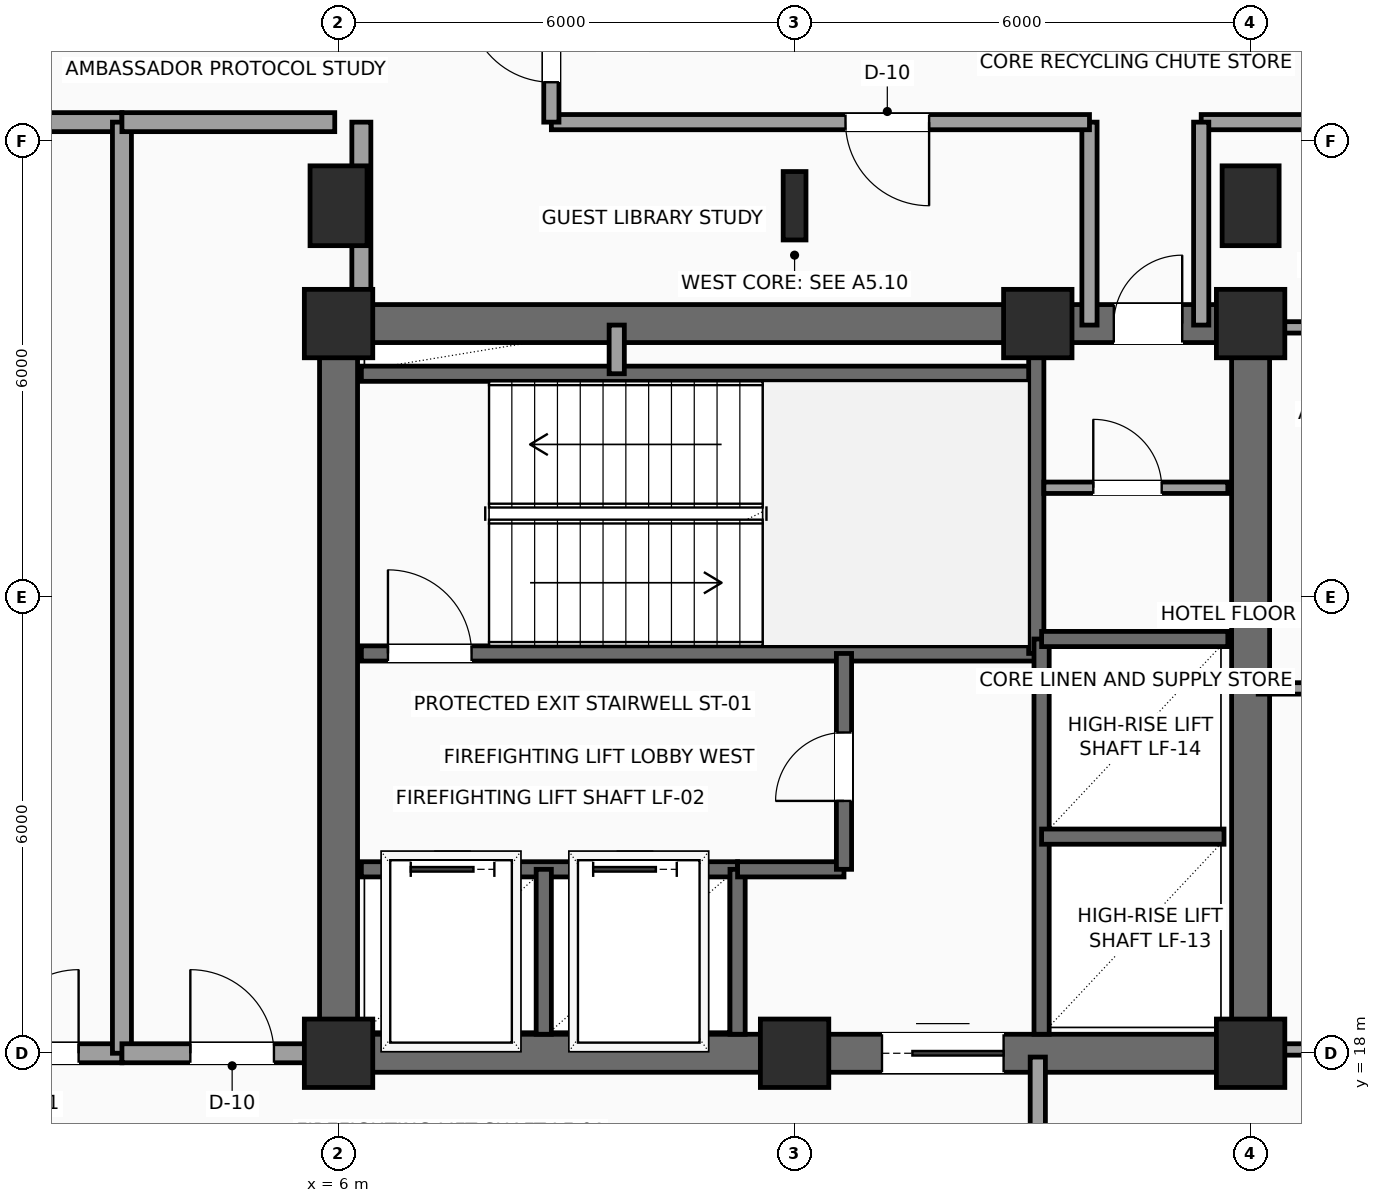
"""IFC4 building model, lengths in metres.
Left out: names, types, materials, properties, quantities, classifications, styles, units other than length and angle.
Written with IfcOpenShell. Run it as: python <this file> out.ifc"""

import sys

from ifc_helpers import new_model, si_unit, direction, frame, frame_2d, origin, origin_2d, place, context, subcontext, project, spatial, rectangle, i_section, extrude, element, fill, save


model = new_model("IFC4")
c1 = context("Model", 3, precision=1e-05, world=origin(), true_north=direction((0.0, 1.0)))
c2 = subcontext(c1, "Body", "Model", "MODEL_VIEW")
j1 = project(units=[si_unit("LENGTHUNIT", "METRE"), si_unit("PLANEANGLEUNIT", "RADIAN")], contexts=[c1])
p1 = place(None, origin())
s1 = spatial("IfcSite", under=j1, at=p1, CompositionType="ELEMENT")
p2 = place(p1, origin())
s2 = spatial("IfcBuilding", under=s1, at=p2, CompositionType="ELEMENT")
p3 = place(p2, frame((0.0, 0.0, 187.95)))
s3 = spatial("IfcBuildingStorey", under=s2, at=p3, CompositionType="ELEMENT", Elevation=187.95)
for number, where, z_axis, x_axis in (
    (1, (6.0, 18.0, 0.0), (0.0, 0.0, 1.0), (1.0, 0.0, 0.0)),
    (2, (12.0, 18.0, 0.0), (0.0, 0.0, 1.0), (1.0, 0.0, 0.0)),
    (3, (18.0, 18.0, 0.0), (0.0, 0.0, 1.0), (1.0, 0.0, 0.0)),
    (4, (6.0, 27.6, 0.0), (0.0, 0.0, 1.0), (1.0, 0.0, 0.0)),
    (5, (15.2, 27.6, 0.0), (0.0, 0.0, 1.0), (1.0, 0.0, 0.0)),
    (6, (18.0, 27.6, 0.0), (0.0, 0.0, 1.0), (1.0, 0.0, 0.0)),
):
    element("IfcColumn", number, at=place(p3, frame(where, z_axis=z_axis, x_axis=x_axis)), inside=s3, PredefinedType="COLUMN", context=c2, shape_type="SweptSolid", body=[
        extrude(rectangle(XDim=0.9, YDim=0.9, at=origin_2d()), origin(), (0.0, 0.0, 1.0), 3.75),
    ])
p4 = place(p3, frame((6.0, 29.15, 0.0), z_axis=(0.0, 0.0, 1.0), x_axis=(1.0, 0.0, 0.0)))
e7 = element("IfcColumn", 7, at=p4, inside=s3, PredefinedType="COLUMN", context=c2, shape_type="SweptSolid", body=[
    extrude(rectangle(XDim=0.75, YDim=1.05, at=origin_2d()), origin(), (0.0, 0.0, 1.0), 3.75),
])
p5 = place(p3, frame((12.0, 29.15, 0.0), z_axis=(0.0, 0.0, 1.0), x_axis=(1.0, 0.0, 0.0)))
e8 = element("IfcColumn", 8, at=p5, inside=s3, PredefinedType="COLUMN", context=c2, shape_type="SweptSolid", body=[
    extrude(i_section(OverallWidth=0.3, OverallDepth=0.9, WebThickness=0.019, FlangeThickness=0.035, FilletRadius=0.03, at=origin_2d()), origin(), (0.0, 0.0, 1.0), 3.75),
])
p6 = place(p3, frame((18.0, 29.15, 0.0), z_axis=(0.0, 0.0, 1.0), x_axis=(1.0, 0.0, 0.0)))
e9 = element("IfcColumn", 9, at=p6, inside=s3, PredefinedType="COLUMN", context=c2, shape_type="SweptSolid", body=[
    extrude(rectangle(XDim=0.75, YDim=1.05, at=origin_2d()), origin(), (0.0, 0.0, 1.0), 3.75),
])
p7 = place(p3, frame((6.0, 18.0, 0.0), z_axis=(0.0, 0.0, 1.0), x_axis=(1.0, 0.0, 0.0)))
e10 = element("IfcWall", 10, at=p7, inside=s3, PredefinedType="SHEAR", context=c2, shape_type="SweptSolid", body=[
    extrude(rectangle(XDim=12.0, YDim=0.5, at=frame_2d((6.0, 0.0))), origin(), (0.0, 0.0, 1.0), 3.54),
])
p8 = place(p7, frame((7.15, 0.0, 0.0)))
e11 = element("IfcOpeningElement", 11, at=p8, cuts=e10, PredefinedType="OPENING", context=c2, shape_type="SweptSolid", body=[
    extrude(rectangle(XDim=1.6, YDim=2.3, at=frame_2d((0.8, 1.15))), frame((0.0, 0.26, 0.0), z_axis=(0.0, -1.0, 0.0), x_axis=(1.0, 0.0, 0.0)), (0.0, 0.0, 1.0), 0.52),
])
p9 = place(p3, frame((6.0, 27.6, 0.0), z_axis=(0.0, 0.0, 1.0), x_axis=(1.0, 0.0, 0.0)))
e12 = element("IfcWall", 12, at=p9, inside=s3, PredefinedType="SHEAR", context=c2, shape_type="SweptSolid", body=[
    extrude(rectangle(XDim=12.0, YDim=0.5, at=frame_2d((6.0, 0.0))), origin(), (0.0, 0.0, 1.0), 3.54),
])
p10 = place(p9, frame((10.2, 0.0, 0.0)))
e13 = element("IfcOpeningElement", 13, at=p10, cuts=e12, PredefinedType="OPENING", context=c2, shape_type="SweptSolid", body=[
    extrude(rectangle(XDim=0.9, YDim=2.15, at=frame_2d((0.45, 1.075))), frame((0.0, 0.26, 0.0), z_axis=(0.0, -1.0, 0.0), x_axis=(1.0, 0.0, 0.0)), (0.0, 0.0, 1.0), 0.52),
])
for number, where, z_axis, x_axis in (
    (14, (6.0, 18.0, 0.0), (0.0, 0.0, 1.0), (0.0, 1.0, 0.0)),
    (15, (18.0, 18.0, 0.0), (0.0, 0.0, 1.0), (0.0, 1.0, 0.0)),
):
    element("IfcWall", number, at=place(p3, frame(where, z_axis=z_axis, x_axis=x_axis)), inside=s3, PredefinedType="SHEAR", context=c2, shape_type="SweptSolid", body=[
        extrude(rectangle(XDim=9.6, YDim=0.5, at=frame_2d((4.8, 0.0))), origin(), (0.0, 0.0, 1.0), 3.54),
    ])
p11 = place(p3, frame((6.3, 23.26, 0.0), z_axis=(0.0, 0.0, 1.0), x_axis=(1.0, 0.0, 0.0)))
e16 = element("IfcWall", 16, at=p11, inside=s3, PredefinedType="SHEAR", context=c2, shape_type="SweptSolid", body=[
    extrude(rectangle(XDim=8.88, YDim=0.2, at=frame_2d((4.44, 0.0))), origin(), (0.0, 0.0, 1.0), 3.54),
])
p12 = place(p11, frame((0.35, 0.0, 0.0)))
e17 = element("IfcOpeningElement", 17, at=p12, cuts=e16, PredefinedType="OPENING", context=c2, shape_type="SweptSolid", body=[
    extrude(rectangle(XDim=1.1, YDim=2.2, at=frame_2d((0.55, 1.1))), frame((0.0, 0.11, 0.0), z_axis=(0.0, -1.0, 0.0), x_axis=(1.0, 0.0, 0.0)), (0.0, 0.0, 1.0), 0.22),
])
p13 = place(p3, frame((6.3, 26.94, 0.0), z_axis=(0.0, 0.0, 1.0), x_axis=(1.0, 0.0, 0.0)))
e18 = element("IfcWall", 18, at=p13, inside=s3, PredefinedType="SHEAR", context=c2, shape_type="SweptSolid", body=[
    extrude(rectangle(XDim=8.88, YDim=0.2, at=frame_2d((4.44, 0.0))), origin(), (0.0, 0.0, 1.0), 3.54),
])
p14 = place(p3, frame((15.18, 23.26, 0.0), z_axis=(0.0, 0.0, 1.0), x_axis=(0.0, 1.0, 0.0)))
e19 = element("IfcWall", 19, at=p14, inside=s3, PredefinedType="SHEAR", context=c2, shape_type="SweptSolid", body=[
    extrude(rectangle(XDim=4.04, YDim=0.2, at=frame_2d((2.02, 0.0))), origin(), (0.0, 0.0, 1.0), 3.54),
])
p15 = place(p3, frame((6.3, 20.42, 0.0), z_axis=(0.0, 0.0, 1.0), x_axis=(1.0, 0.0, 0.0)))
e20 = element("IfcWall", 20, at=p15, inside=s3, PredefinedType="SHEAR", context=c2, shape_type="SweptSolid", body=[
    extrude(rectangle(XDim=4.95, YDim=0.2, at=frame_2d((2.475, 0.0))), origin(), (0.0, 0.0, 1.0), 3.54),
])
p16 = place(p15, frame((0.65, 0.0, 0.0)))
e21 = element("IfcOpeningElement", 21, at=p16, cuts=e20, PredefinedType="OPENING", context=c2, shape_type="SweptSolid", body=[
    extrude(rectangle(XDim=1.1, YDim=2.2, at=frame_2d((0.55, 1.1))), frame((0.0, 0.11, 0.0), z_axis=(0.0, -1.0, 0.0), x_axis=(1.0, 0.0, 0.0)), (0.0, 0.0, 1.0), 0.22),
])
p17 = place(p15, frame((3.05, 0.0, 0.0)))
e22 = element("IfcOpeningElement", 22, at=p17, cuts=e20, PredefinedType="OPENING", context=c2, shape_type="SweptSolid", body=[
    extrude(rectangle(XDim=1.1, YDim=2.2, at=frame_2d((0.55, 1.1))), frame((0.0, 0.11, 0.0), z_axis=(0.0, -1.0, 0.0), x_axis=(1.0, 0.0, 0.0)), (0.0, 0.0, 1.0), 0.22),
])
for number, where, z_axis, x_axis in (
    (23, (8.7, 18.25, 0.0), (0.0, 0.0, 1.0), (0.0, 1.0, 0.0)),
    (24, (11.25, 18.25, 0.0), (0.0, 0.0, 1.0), (0.0, 1.0, 0.0)),
):
    element("IfcWall", number, at=place(p3, frame(where, z_axis=z_axis, x_axis=x_axis)), inside=s3, PredefinedType="SHEAR", context=c2, shape_type="SweptSolid", body=[
        extrude(rectangle(XDim=2.17, YDim=0.2, at=frame_2d((1.085, 0.0))), origin(), (0.0, 0.0, 1.0), 3.54),
    ])
p18 = place(p3, frame((11.25, 20.42, 0.0), z_axis=(0.0, 0.0, 1.0), x_axis=(1.0, 0.0, 0.0)))
e25 = element("IfcWall", 25, at=p18, inside=s3, PredefinedType="SHEAR", context=c2, shape_type="SweptSolid", body=[
    extrude(rectangle(XDim=1.4, YDim=0.2, at=frame_2d((0.7, 0.0))), origin(), (0.0, 0.0, 1.0), 3.54),
])
p19 = place(p3, frame((12.65, 20.42, 0.0), z_axis=(0.0, 0.0, 1.0), x_axis=(0.0, 1.0, 0.0)))
e26 = element("IfcWall", 26, at=p19, inside=s3, PredefinedType="SHEAR", context=c2, shape_type="SweptSolid", body=[
    extrude(rectangle(XDim=2.84, YDim=0.2, at=frame_2d((1.42, 0.0))), origin(), (0.0, 0.0, 1.0), 3.54),
])
p20 = place(p19, frame((0.9, 0.0, 0.0)))
e27 = element("IfcOpeningElement", 27, at=p20, cuts=e26, PredefinedType="OPENING", context=c2, shape_type="SweptSolid", body=[
    extrude(rectangle(XDim=0.9, YDim=2.15, at=frame_2d((0.45, 1.075))), frame((0.0, 0.11, 0.0), z_axis=(0.0, -1.0, 0.0), x_axis=(1.0, 0.0, 0.0)), (0.0, 0.0, 1.0), 0.22),
])
p21 = place(p3, frame((9.66, 26.94, 0.0), z_axis=(0.0, 0.0, 1.0), x_axis=(0.0, 1.0, 0.0)))
e28 = element("IfcWall", 28, at=p21, inside=s3, PredefinedType="SOLIDWALL", context=c2, shape_type="SweptSolid", body=[
    extrude(rectangle(XDim=0.64, YDim=0.2, at=frame_2d((0.32, 0.0))), origin(), (0.0, 0.0, 1.0), 3.54),
])
p22 = place(p3, frame((15.25, 18.25, 0.0), z_axis=(0.0, 0.0, 1.0), x_axis=(0.0, 1.0, 0.0)))
e29 = element("IfcWall", 29, at=p22, inside=s3, PredefinedType="SHEAR", context=c2, shape_type="SweptSolid", body=[
    extrude(rectangle(XDim=5.2, YDim=0.2, at=frame_2d((2.6, 0.0))), origin(), (0.0, 0.0, 1.0), 3.54),
])
p23 = place(p3, frame((15.25, 20.85, 0.0), z_axis=(0.0, 0.0, 1.0), x_axis=(1.0, 0.0, 0.0)))
e30 = element("IfcWall", 30, at=p23, inside=s3, PredefinedType="SHEAR", context=c2, shape_type="SweptSolid", body=[
    extrude(rectangle(XDim=2.4, YDim=0.2, at=frame_2d((1.2, 0.0))), origin(), (0.0, 0.0, 1.0), 3.54),
])
p24 = place(p3, frame((15.25, 23.45, 0.0), z_axis=(0.0, 0.0, 1.0), x_axis=(1.0, 0.0, 0.0)))
e31 = element("IfcWall", 31, at=p24, inside=s3, PredefinedType="SHEAR", context=c2, shape_type="SweptSolid", body=[
    extrude(rectangle(XDim=2.45, YDim=0.2, at=frame_2d((1.225, 0.0))), origin(), (0.0, 0.0, 1.0), 3.54),
])
p25 = place(p3, frame((15.28, 25.44, 0.0), z_axis=(0.0, 0.0, 1.0), x_axis=(1.0, 0.0, 0.0)))
e32 = element("IfcWall", 32, at=p25, inside=s3, PredefinedType="PARTITIONING", context=c2, shape_type="SweptSolid", body=[
    extrude(rectangle(XDim=2.42, YDim=0.15, at=frame_2d((1.21, 0.0))), origin(), (0.0, 0.0, 1.0), 3.54),
])
p26 = place(p25, frame((0.65, 0.0, 0.0)))
e33 = element("IfcOpeningElement", 33, at=p26, cuts=e32, PredefinedType="OPENING", context=c2, shape_type="SweptSolid", body=[
    extrude(rectangle(XDim=0.9, YDim=2.15, at=frame_2d((0.45, 1.075))), frame((0.0, 0.085, 0.0), z_axis=(0.0, -1.0, 0.0), x_axis=(1.0, 0.0, 0.0)), (0.0, 0.0, 1.0), 0.17),
])
p27 = place(p3, frame((15.2, 17.95, 0.0), z_axis=(0.0, 0.0, 1.0), x_axis=(0.0, -1.0, 0.0)))
e34 = element("IfcWall", 34, at=p27, inside=s3, PredefinedType="SOLIDWALL", context=c2, shape_type="SweptSolid", body=[
    extrude(rectangle(XDim=1.7, YDim=0.2, at=frame_2d((0.85, 0.0))), origin(), (0.0, 0.0, 1.0), 3.54),
])
p28 = place(p3, frame((21.45, 30.25, 0.0), z_axis=(0.0, 0.0, 1.0), x_axis=(-1.0, 0.0, 0.0)))
e35 = element("IfcWall", 35, at=p28, inside=s3, PredefinedType="SOLIDWALL", context=c2, shape_type="SweptSolid", body=[
    extrude(rectangle(XDim=4.1, YDim=0.2, at=frame_2d((2.05, 0.0))), origin(), (0.0, 0.0, 1.0), 3.54),
])
p29 = place(p28, frame((1.55, 0.0, 0.0)))
e36 = element("IfcOpeningElement", 36, at=p29, cuts=e35, PredefinedType="OPENING", context=c2, shape_type="SweptSolid", body=[
    extrude(rectangle(XDim=1.1, YDim=2.25, at=frame_2d((0.55, 1.125))), frame((0.0, 0.11, 0.0), z_axis=(0.0, -1.0, 0.0), x_axis=(1.0, 0.0, 0.0)), (0.0, 0.0, 1.0), 0.22),
])
for number, where, z_axis, x_axis in (
    (37, (17.35, 30.25, 0.0), (0.0, 0.0, 1.0), (0.0, -1.0, 0.0)),
    (38, (15.88, 27.58, 0.0), (0.0, 0.0, 1.0), (0.0, 1.0, 0.0)),
):
    element("IfcWall", number, at=place(p3, frame(where, z_axis=z_axis, x_axis=x_axis)), inside=s3, PredefinedType="SOLIDWALL", context=c2, shape_type="SweptSolid", body=[
        extrude(rectangle(XDim=2.67, YDim=0.2, at=frame_2d((1.335, 0.0))), origin(), (0.0, 0.0, 1.0), 3.54),
    ])
p30 = place(p3, frame((15.88, 30.25, 0.0), z_axis=(0.0, 0.0, 1.0), x_axis=(-1.0, 0.0, 0.0)))
e39 = element("IfcWall", 39, at=p30, inside=s3, PredefinedType="SOLIDWALL", context=c2, shape_type="SweptSolid", body=[
    extrude(rectangle(XDim=7.08, YDim=0.2, at=frame_2d((3.54, 0.0))), origin(), (0.0, 0.0, 1.0), 3.54),
])
p31 = place(p30, frame((2.11, 0.0, 0.0)))
e40 = element("IfcOpeningElement", 40, at=p31, cuts=e39, PredefinedType="OPENING", context=c2, shape_type="SweptSolid", body=[
    extrude(rectangle(XDim=1.1, YDim=2.25, at=frame_2d((0.55, 1.125))), frame((0.0, 0.11, 0.0), z_axis=(0.0, -1.0, 0.0), x_axis=(1.0, 0.0, 0.0)), (0.0, 0.0, 1.0), 0.22),
])
p32 = place(p3, frame((8.8, 30.25, 0.0), z_axis=(0.0, 0.0, 1.0), x_axis=(0.0, 1.0, 0.0)))
e41 = element("IfcWall", 41, at=p32, inside=s3, PredefinedType="SOLIDWALL", context=c2, shape_type="SweptSolid", body=[
    extrude(rectangle(XDim=2.05, YDim=0.2, at=frame_2d((1.025, 0.0))), origin(), (0.0, 0.0, 1.0), 3.54),
])
p33 = place(p32, frame((0.525, 0.0, 0.0)))
e42 = element("IfcOpeningElement", 42, at=p33, cuts=e41, PredefinedType="OPENING", context=c2, shape_type="SweptSolid", body=[
    extrude(rectangle(XDim=1.1, YDim=2.25, at=frame_2d((0.55, 1.125))), frame((0.0, 0.11, 0.0), z_axis=(0.0, -1.0, 0.0), x_axis=(1.0, 0.0, 0.0)), (0.0, 0.0, 1.0), 0.22),
])
p34 = place(p3, frame((18.1, 18.05, 0.0), z_axis=(0.0, 0.0, 1.0), x_axis=(1.0, 0.0, 0.0)))
e43 = element("IfcWall", 43, at=p34, inside=s3, PredefinedType="PARTITIONING", context=c2, shape_type="SweptSolid", body=[
    extrude(rectangle(XDim=3.25, YDim=0.15, at=frame_2d((1.625, 0.0))), origin(), (0.0, 0.0, 1.0), 3.132),
])
for number, where, z_axis, x_axis in (
    (44, (18.1, 22.8, 0.0), (0.0, 0.0, 1.0), (1.0, 0.0, 0.0)),
    (45, (18.1, 27.55, 0.0), (0.0, 0.0, 1.0), (1.0, 0.0, 0.0)),
):
    element("IfcWall", number, at=place(p3, frame(where, z_axis=z_axis, x_axis=x_axis)), inside=s3, PredefinedType="PARTITIONING", context=c2, shape_type="SweptSolid", body=[
        extrude(rectangle(XDim=3.25, YDim=0.15, at=frame_2d((1.625, 0.0))), origin(), (0.0, 0.0, 1.0), 3.54),
    ])
p35 = place(p3, frame((0.3, 18.0, 0.0), z_axis=(0.0, 0.0, 1.0), x_axis=(1.0, 0.0, 0.0)))
e46 = element("IfcWall", 46, at=p35, inside=s3, PredefinedType="PARTITIONING", context=c2, shape_type="SweptSolid", body=[
    extrude(rectangle(XDim=2.85, YDim=0.25, at=frame_2d((1.425, 0.0))), origin(), (0.0, 0.0, 1.0), 3.132),
])
p36 = place(p35, frame((1.18, 0.0, 0.0)))
e47 = element("IfcOpeningElement", 47, at=p36, cuts=e46, PredefinedType="OPENING", context=c2, shape_type="SweptSolid", body=[
    extrude(rectangle(XDim=1.1, YDim=2.25, at=frame_2d((0.55, 1.125))), frame((0.0, 0.135, 0.0), z_axis=(0.0, -1.0, 0.0), x_axis=(1.0, 0.0, 0.0)), (0.0, 0.0, 1.0), 0.27),
])
p37 = place(p3, frame((0.3, 30.25, 0.0), z_axis=(0.0, 0.0, 1.0), x_axis=(1.0, 0.0, 0.0)))
e48 = element("IfcWall", 48, at=p37, inside=s3, PredefinedType="PARTITIONING", context=c2, shape_type="SweptSolid", body=[
    extrude(rectangle(XDim=2.85, YDim=0.25, at=frame_2d((1.425, 0.0))), origin(), (0.0, 0.0, 1.0), 3.54),
])
p38 = place(p3, frame((3.15, 18.0, 0.0), z_axis=(0.0, 0.0, 1.0), x_axis=(0.0, 1.0, 0.0)))
e49 = element("IfcWall", 49, at=p38, inside=s3, PredefinedType="PARTITIONING", context=c2, shape_type="SweptSolid", body=[
    extrude(rectangle(XDim=12.25, YDim=0.25, at=frame_2d((6.125, 0.0))), origin(), (0.0, 0.0, 1.0), 3.54),
])
p39 = place(p3, frame((3.15, 18.0, 0.0), z_axis=(0.0, 0.0, 1.0), x_axis=(1.0, 0.0, 0.0)))
e50 = element("IfcWall", 50, at=p39, inside=s3, PredefinedType="PARTITIONING", context=c2, shape_type="SweptSolid", body=[
    extrude(rectangle(XDim=2.8, YDim=0.25, at=frame_2d((1.4, 0.0))), origin(), (0.0, 0.0, 1.0), 3.132),
])
p40 = place(p39, frame((0.9, 0.0, 0.0)))
e51 = element("IfcOpeningElement", 51, at=p40, cuts=e50, PredefinedType="OPENING", context=c2, shape_type="SweptSolid", body=[
    extrude(rectangle(XDim=1.1, YDim=2.25, at=frame_2d((0.55, 1.125))), frame((0.0, 0.135, 0.0), z_axis=(0.0, -1.0, 0.0), x_axis=(1.0, 0.0, 0.0)), (0.0, 0.0, 1.0), 0.27),
])
p41 = place(p3, frame((3.15, 30.25, 0.0), z_axis=(0.0, 0.0, 1.0), x_axis=(1.0, 0.0, 0.0)))
e52 = element("IfcWall", 52, at=p41, inside=s3, PredefinedType="PARTITIONING", context=c2, shape_type="SweptSolid", body=[
    extrude(rectangle(XDim=2.8, YDim=0.25, at=frame_2d((1.4, 0.0))), origin(), (0.0, 0.0, 1.0), 3.54),
])
p42 = place(p3, frame((6.3, 27.65, 0.0), z_axis=(0.0, 0.0, 1.0), x_axis=(0.0, 1.0, 0.0)))
e53 = element("IfcWall", 53, at=p42, inside=s3, PredefinedType="PARTITIONING", context=c2, shape_type="SweptSolid", body=[
    extrude(rectangle(XDim=2.6, YDim=0.25, at=frame_2d((1.3, 0.0))), origin(), (0.0, 0.0, 1.0), 3.132),
])
p43 = place(p8, origin())
e54 = element("IfcDoor", 54, at=p43, inside=s3, OperationType="DOUBLE_DOOR_SLIDING", PredefinedType="DOOR", context=c2, shape_type="SweptSolid", body=[
    extrude(rectangle(XDim=1.6, YDim=2.3, at=frame_2d((0.8, 1.15))), frame((0.0, 0.025, 0.0), z_axis=(0.0, -1.0, 0.0), x_axis=(1.0, 0.0, 0.0)), (0.0, 0.0, 1.0), 0.05),
])
fill(e11, e54)
p44 = place(p10, origin())
e55 = element("IfcDoor", 55, at=p44, inside=s3, OperationType="SINGLE_SWING_RIGHT", PredefinedType="DOOR", context=c2, shape_type="SweptSolid", body=[
    extrude(rectangle(XDim=0.9, YDim=2.15, at=frame_2d((0.45, 1.075))), frame((0.0, 0.025, 0.0), z_axis=(0.0, -1.0, 0.0), x_axis=(1.0, 0.0, 0.0)), (0.0, 0.0, 1.0), 0.05),
])
fill(e13, e55)
p45 = place(p12, origin())
e56 = element("IfcDoor", 56, at=p45, inside=s3, OperationType="SINGLE_SWING_LEFT", PredefinedType="DOOR", context=c2, shape_type="SweptSolid", body=[
    extrude(rectangle(XDim=1.1, YDim=2.2, at=frame_2d((0.55, 1.1))), frame((0.0, 0.025, 0.0), z_axis=(0.0, -1.0, 0.0), x_axis=(1.0, 0.0, 0.0)), (0.0, 0.0, 1.0), 0.05),
])
fill(e17, e56)
p46 = place(p16, origin())
e57 = element("IfcDoor", 57, at=p46, inside=s3, OperationType="SLIDING_TO_LEFT", PredefinedType="DOOR", context=c2, shape_type="SweptSolid", body=[
    extrude(rectangle(XDim=1.1, YDim=2.2, at=frame_2d((0.55, 1.1))), frame((0.0, 0.025, 0.0), z_axis=(0.0, -1.0, 0.0), x_axis=(1.0, 0.0, 0.0)), (0.0, 0.0, 1.0), 0.05),
])
fill(e21, e57)
p47 = place(p17, origin())
e58 = element("IfcDoor", 58, at=p47, inside=s3, OperationType="SLIDING_TO_LEFT", PredefinedType="DOOR", context=c2, shape_type="SweptSolid", body=[
    extrude(rectangle(XDim=1.1, YDim=2.2, at=frame_2d((0.55, 1.1))), frame((0.0, 0.025, 0.0), z_axis=(0.0, -1.0, 0.0), x_axis=(1.0, 0.0, 0.0)), (0.0, 0.0, 1.0), 0.05),
])
fill(e22, e58)
p48 = place(p20, origin())
e59 = element("IfcDoor", 59, at=p48, inside=s3, OperationType="SINGLE_SWING_LEFT", PredefinedType="DOOR", context=c2, shape_type="SweptSolid", body=[
    extrude(rectangle(XDim=0.9, YDim=2.15, at=frame_2d((0.45, 1.075))), frame((0.0, 0.025, 0.0), z_axis=(0.0, -1.0, 0.0), x_axis=(1.0, 0.0, 0.0)), (0.0, 0.0, 1.0), 0.05),
])
fill(e27, e59)
p49 = place(p26, origin())
e60 = element("IfcDoor", 60, at=p49, inside=s3, OperationType="SINGLE_SWING_LEFT", PredefinedType="DOOR", context=c2, shape_type="SweptSolid", body=[
    extrude(rectangle(XDim=0.9, YDim=2.15, at=frame_2d((0.45, 1.075))), frame((0.0, 0.025, 0.0), z_axis=(0.0, -1.0, 0.0), x_axis=(1.0, 0.0, 0.0)), (0.0, 0.0, 1.0), 0.05),
])
fill(e33, e60)
p50 = place(p31, origin())
e61 = element("IfcDoor", 61, at=p50, inside=s3, OperationType="SINGLE_SWING_LEFT", PredefinedType="DOOR", context=c2, shape_type="SweptSolid", body=[
    extrude(rectangle(XDim=1.1, YDim=2.25, at=frame_2d((0.55, 1.125))), frame((0.0, 0.025, 0.0), z_axis=(0.0, -1.0, 0.0), x_axis=(1.0, 0.0, 0.0)), (0.0, 0.0, 1.0), 0.05),
])
fill(e40, e61)
p51 = place(p33, origin())
e62 = element("IfcDoor", 62, at=p51, inside=s3, OperationType="SINGLE_SWING_RIGHT", PredefinedType="DOOR", context=c2, shape_type="SweptSolid", body=[
    extrude(rectangle(XDim=1.1, YDim=2.25, at=frame_2d((0.55, 1.125))), frame((0.0, 0.025, 0.0), z_axis=(0.0, -1.0, 0.0), x_axis=(1.0, 0.0, 0.0)), (0.0, 0.0, 1.0), 0.05),
])
fill(e42, e62)
p52 = place(p36, origin())
e63 = element("IfcDoor", 63, at=p52, inside=s3, OperationType="SINGLE_SWING_RIGHT", PredefinedType="DOOR", context=c2, shape_type="SweptSolid", body=[
    extrude(rectangle(XDim=1.1, YDim=2.25, at=frame_2d((0.55, 1.125))), frame((0.0, 0.025, 0.0), z_axis=(0.0, -1.0, 0.0), x_axis=(1.0, 0.0, 0.0)), (0.0, 0.0, 1.0), 0.05),
])
fill(e47, e63)
p53 = place(p40, origin())
e64 = element("IfcDoor", 64, at=p53, inside=s3, OperationType="SINGLE_SWING_LEFT", PredefinedType="DOOR", context=c2, shape_type="SweptSolid", body=[
    extrude(rectangle(XDim=1.1, YDim=2.25, at=frame_2d((0.55, 1.125))), frame((0.0, 0.025, 0.0), z_axis=(0.0, -1.0, 0.0), x_axis=(1.0, 0.0, 0.0)), (0.0, 0.0, 1.0), 0.05),
])
fill(e51, e64)
save(model, sys.argv[1])
